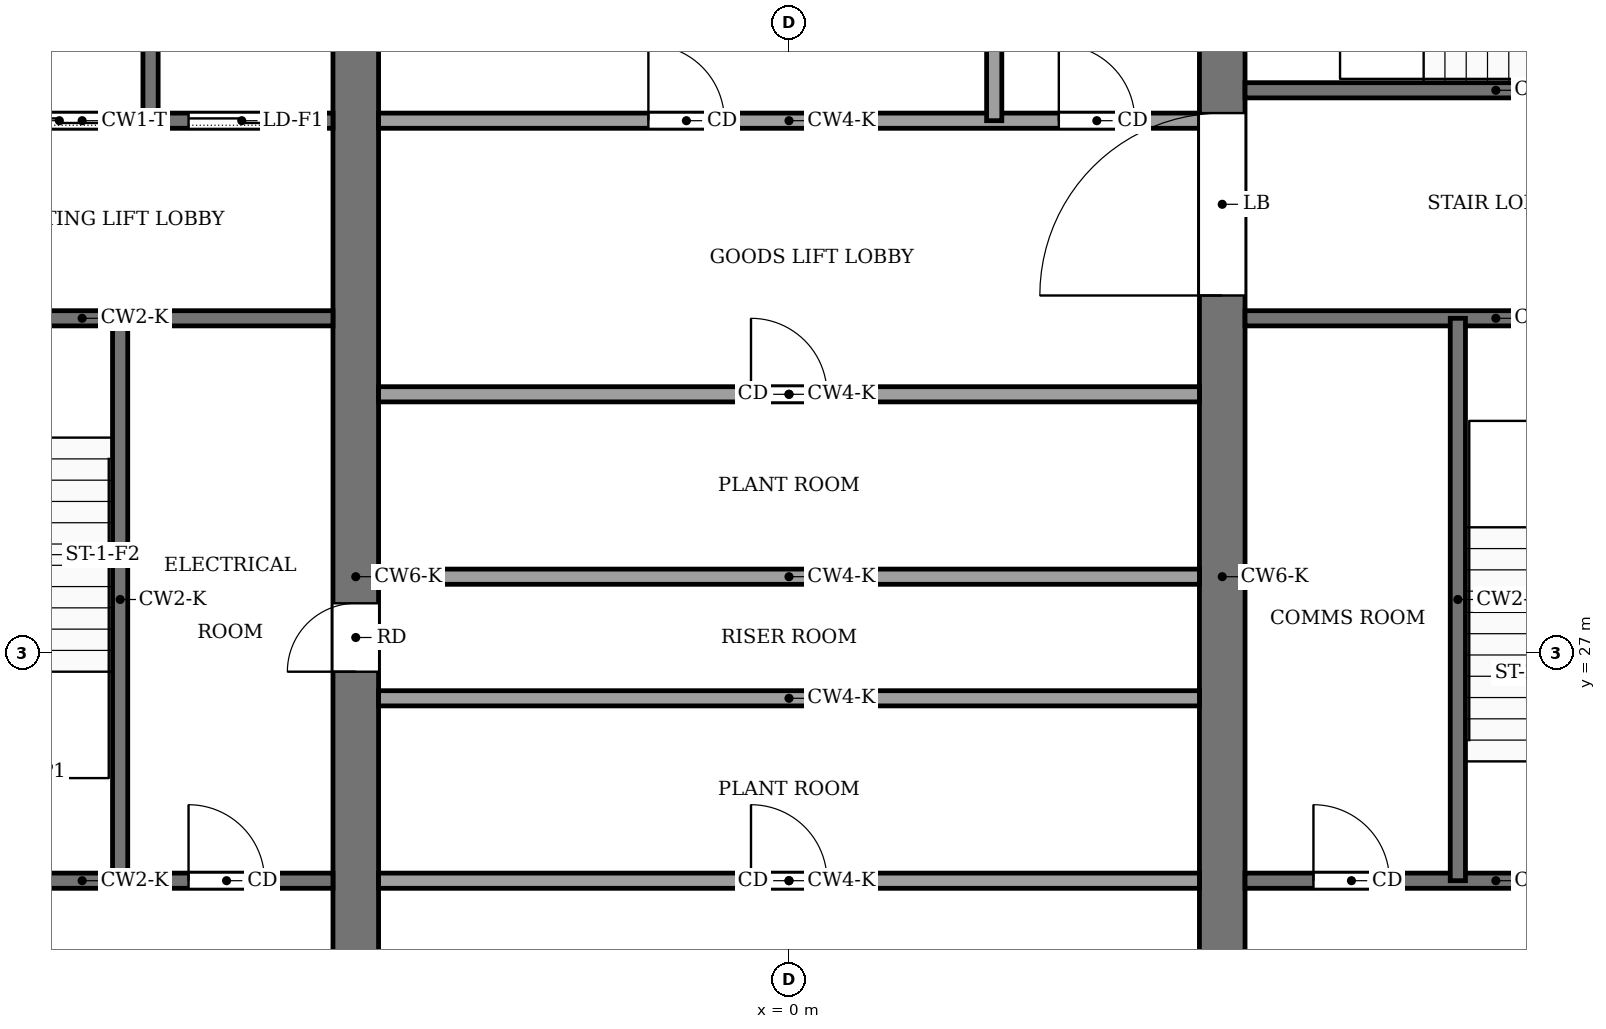
"""IFC4 building model, lengths in metres.
Left out: names, types, materials, properties, quantities, classifications, styles, units other than length and angle.
Written with IfcOpenShell. Run it as: python <this file> out.ifc"""

import sys

from ifc_helpers import new_model, si_unit, direction, frame, frame_2d, origin, place, context, subcontext, project, spatial, rectangle, extrude, element, fill, save


model = new_model("IFC4")
c1 = context("Model", 3, precision=1e-05, world=origin(), true_north=direction((0.0, 1.0)))
c2 = subcontext(c1, "Body", "Model", "MODEL_VIEW")
j1 = project(units=[si_unit("LENGTHUNIT", "METRE"), si_unit("PLANEANGLEUNIT", "RADIAN")], contexts=[c1])
p1 = place(None, origin())
s1 = spatial("IfcSite", under=j1, at=p1, CompositionType="ELEMENT")
p2 = place(p1, origin())
s2 = spatial("IfcBuilding", under=s1, at=p2, CompositionType="ELEMENT")
p3 = place(p2, frame((0.0, 0.0, 364.0)))
s3 = spatial("IfcBuildingStorey", under=s2, at=p3, CompositionType="ELEMENT", Elevation=364.0)
p4 = place(p3, frame((-5.7, 18.4, -0.15), z_axis=(0.0, 0.0, 1.0), x_axis=(0.0, 1.0, 0.0)))
e1 = element("IfcWall", 1, at=p4, inside=s3, PredefinedType="SHEAR", context=c2, shape_type="SweptSolid", body=[
    extrude(rectangle(XDim=19.2, YDim=0.6, at=frame_2d((9.6, 0.0))), origin(), (0.0, 0.0, 1.0), 4.0),
])
p5 = place(p4, frame((8.35, 0.0, 0.15)))
e2 = element("IfcOpeningElement", 2, at=p5, cuts=e1, PredefinedType="OPENING", context=c2, shape_type="SweptSolid", body=[
    extrude(rectangle(XDim=0.9, YDim=2.1, at=frame_2d((0.45, 1.05))), frame((0.0, 0.31, 0.0), z_axis=(0.0, -1.0, 0.0), x_axis=(1.0, 0.0, 0.0)), (0.0, 0.0, 1.0), 0.62),
])
p6 = place(p3, frame((5.7, 18.4, -0.15), z_axis=(0.0, 0.0, 1.0), x_axis=(0.0, 1.0, 0.0)))
e3 = element("IfcWall", 3, at=p6, inside=s3, PredefinedType="SHEAR", context=c2, shape_type="SweptSolid", body=[
    extrude(rectangle(XDim=19.2, YDim=0.6, at=frame_2d((9.6, 0.0))), origin(), (0.0, 0.0, 1.0), 4.0),
])
p7 = place(p6, frame((13.3, 0.0, 0.15)))
e4 = element("IfcOpeningElement", 4, at=p7, cuts=e3, PredefinedType="OPENING", context=c2, shape_type="SweptSolid", body=[
    extrude(rectangle(XDim=2.4, YDim=2.4, at=frame_2d((1.2, 1.2))), frame((0.0, 0.31, 0.0), z_axis=(0.0, -1.0, 0.0), x_axis=(1.0, 0.0, 0.0)), (0.0, 0.0, 1.0), 0.62),
])
p8 = place(p3, frame((-12.6, 24.0, 0.0), z_axis=(0.0, 0.0, 1.0), x_axis=(1.0, 0.0, 0.0)))
e5 = element("IfcWall", 5, at=p8, inside=s3, PredefinedType="PARTITIONING", context=c2, shape_type="SweptSolid", body=[
    extrude(rectangle(XDim=6.6, YDim=0.2, at=frame_2d((3.3, 0.0))), origin(), (0.0, 0.0, 1.0), 3.85),
])
p9 = place(p8, frame((4.7, 0.0, 0.0)))
e6 = element("IfcOpeningElement", 6, at=p9, cuts=e5, PredefinedType="OPENING", context=c2, shape_type="SweptSolid", body=[
    extrude(rectangle(XDim=1.0, YDim=2.1, at=frame_2d((0.5, 1.05))), frame((0.0, 0.11, 0.0), z_axis=(0.0, -1.0, 0.0), x_axis=(1.0, 0.0, 0.0)), (0.0, 0.0, 1.0), 0.22),
])
p10 = place(p3, frame((-5.4, 24.0, 0.0), z_axis=(0.0, 0.0, 1.0), x_axis=(1.0, 0.0, 0.0)))
e7 = element("IfcWall", 7, at=p10, inside=s3, PredefinedType="PARTITIONING", context=c2, shape_type="SweptSolid", body=[
    extrude(rectangle(XDim=10.8, YDim=0.2, at=frame_2d((5.4, 0.0))), origin(), (0.0, 0.0, 1.0), 3.85),
])
p11 = place(p10, frame((4.9, 0.0, 0.0)))
e8 = element("IfcOpeningElement", 8, at=p11, cuts=e7, PredefinedType="OPENING", context=c2, shape_type="SweptSolid", body=[
    extrude(rectangle(XDim=1.0, YDim=2.1, at=frame_2d((0.5, 1.05))), frame((0.0, 0.11, 0.0), z_axis=(0.0, -1.0, 0.0), x_axis=(1.0, 0.0, 0.0)), (0.0, 0.0, 1.0), 0.22),
])
p12 = place(p3, frame((6.0, 24.0, 0.0), z_axis=(0.0, 0.0, 1.0), x_axis=(1.0, 0.0, 0.0)))
e9 = element("IfcWall", 9, at=p12, inside=s3, PredefinedType="PARTITIONING", context=c2, shape_type="SweptSolid", body=[
    extrude(rectangle(XDim=6.6, YDim=0.2, at=frame_2d((3.3, 0.0))), origin(), (0.0, 0.0, 1.0), 3.85),
])
p13 = place(p12, frame((0.9, 0.0, 0.0)))
e10 = element("IfcOpeningElement", 10, at=p13, cuts=e9, PredefinedType="OPENING", context=c2, shape_type="SweptSolid", body=[
    extrude(rectangle(XDim=1.0, YDim=2.1, at=frame_2d((0.5, 1.05))), frame((0.0, 0.11, 0.0), z_axis=(0.0, -1.0, 0.0), x_axis=(1.0, 0.0, 0.0)), (0.0, 0.0, 1.0), 0.22),
])
p14 = place(p12, frame((4.4, 0.0, 0.0)))
e11 = element("IfcOpeningElement", 11, at=p14, cuts=e9, PredefinedType="OPENING", context=c2, shape_type="SweptSolid", body=[
    extrude(rectangle(XDim=1.2, YDim=2.2, at=frame_2d((0.6, 1.1))), frame((0.0, 0.11, 0.0), z_axis=(0.0, -1.0, 0.0), x_axis=(1.0, 0.0, 0.0)), (0.0, 0.0, 1.0), 0.22),
])
for number, where, z_axis, x_axis in (
    (12, (-5.4, 26.4, 0.0), (0.0, 0.0, 1.0), (1.0, 0.0, 0.0)),
    (13, (-5.4, 28.0, 0.0), (0.0, 0.0, 1.0), (1.0, 0.0, 0.0)),
):
    element("IfcWall", number, at=place(p3, frame(where, z_axis=z_axis, x_axis=x_axis)), inside=s3, PredefinedType="PARTITIONING", context=c2, shape_type="SweptSolid", body=[
        extrude(rectangle(XDim=10.8, YDim=0.2, at=frame_2d((5.4, 0.0))), origin(), (0.0, 0.0, 1.0), 3.85),
    ])
p15 = place(p3, frame((-5.4, 30.4, 0.0), z_axis=(0.0, 0.0, 1.0), x_axis=(1.0, 0.0, 0.0)))
e14 = element("IfcWall", 14, at=p15, inside=s3, PredefinedType="PARTITIONING", context=c2, shape_type="SweptSolid", body=[
    extrude(rectangle(XDim=10.8, YDim=0.2, at=frame_2d((5.4, 0.0))), origin(), (0.0, 0.0, 1.0), 3.85),
])
p16 = place(p15, frame((4.9, 0.0, 0.0)))
e15 = element("IfcOpeningElement", 15, at=p16, cuts=e14, PredefinedType="OPENING", context=c2, shape_type="SweptSolid", body=[
    extrude(rectangle(XDim=1.0, YDim=2.1, at=frame_2d((0.5, 1.05))), frame((0.0, 0.11, 0.0), z_axis=(0.0, -1.0, 0.0), x_axis=(1.0, 0.0, 0.0)), (0.0, 0.0, 1.0), 0.22),
])
p17 = place(p3, frame((-12.6, 31.4, 0.0), z_axis=(0.0, 0.0, 1.0), x_axis=(1.0, 0.0, 0.0)))
e16 = element("IfcWall", 16, at=p17, inside=s3, PredefinedType="PARTITIONING", context=c2, shape_type="SweptSolid", body=[
    extrude(rectangle(XDim=6.6, YDim=0.2, at=frame_2d((3.3, 0.0))), origin(), (0.0, 0.0, 1.0), 3.85),
])
p18 = place(p17, frame((1.0, 0.0, 0.0)))
e17 = element("IfcOpeningElement", 17, at=p18, cuts=e16, PredefinedType="OPENING", context=c2, shape_type="SweptSolid", body=[
    extrude(rectangle(XDim=1.2, YDim=2.2, at=frame_2d((0.6, 1.1))), frame((0.0, 0.11, 0.0), z_axis=(0.0, -1.0, 0.0), x_axis=(1.0, 0.0, 0.0)), (0.0, 0.0, 1.0), 0.22),
])
p19 = place(p3, frame((6.0, 31.4, 0.0), z_axis=(0.0, 0.0, 1.0), x_axis=(1.0, 0.0, 0.0)))
e18 = element("IfcWall", 18, at=p19, inside=s3, PredefinedType="PARTITIONING", context=c2, shape_type="SweptSolid", body=[
    extrude(rectangle(XDim=6.6, YDim=0.2, at=frame_2d((3.3, 0.0))), origin(), (0.0, 0.0, 1.0), 3.85),
])
p20 = place(p3, frame((-12.6, 34.0, 0.0), z_axis=(0.0, 0.0, 1.0), x_axis=(1.0, 0.0, 0.0)))
e19 = element("IfcWall", 19, at=p20, inside=s3, PredefinedType="PARTITIONING", context=c2, shape_type="SweptSolid", body=[
    extrude(rectangle(XDim=6.6, YDim=0.2, at=frame_2d((3.3, 0.0))), origin(), (0.0, 0.0, 1.0), 3.85),
])
p21 = place(p20, frame((4.7, 0.0, 0.0)))
e20 = element("IfcOpeningElement", 20, at=p21, cuts=e19, PredefinedType="OPENING", context=c2, shape_type="SweptSolid", body=[
    extrude(rectangle(XDim=1.4, YDim=2.2, at=frame_2d((0.7, 1.1))), frame((0.0, 0.11, 0.0), z_axis=(0.0, -1.0, 0.0), x_axis=(1.0, 0.0, 0.0)), (0.0, 0.0, 1.0), 0.22),
])
p22 = place(p20, frame((2.3, 0.0, 0.0)))
e21 = element("IfcOpeningElement", 21, at=p22, cuts=e19, PredefinedType="OPENING", context=c2, shape_type="SweptSolid", body=[
    extrude(rectangle(XDim=1.4, YDim=2.2, at=frame_2d((0.7, 1.1))), frame((0.0, 0.11, 0.0), z_axis=(0.0, -1.0, 0.0), x_axis=(1.0, 0.0, 0.0)), (0.0, 0.0, 1.0), 0.22),
])
p23 = place(p20, frame((0.45, 0.0, 0.0)))
e22 = element("IfcOpeningElement", 22, at=p23, cuts=e19, PredefinedType="OPENING", context=c2, shape_type="SweptSolid", body=[
    extrude(rectangle(XDim=0.9, YDim=2.1, at=frame_2d((0.45, 1.05))), frame((0.0, 0.11, 0.0), z_axis=(0.0, -1.0, 0.0), x_axis=(1.0, 0.0, 0.0)), (0.0, 0.0, 1.0), 0.22),
])
p24 = place(p3, frame((-5.4, 34.0, 0.0), z_axis=(0.0, 0.0, 1.0), x_axis=(1.0, 0.0, 0.0)))
e23 = element("IfcWall", 23, at=p24, inside=s3, PredefinedType="PARTITIONING", context=c2, shape_type="SweptSolid", body=[
    extrude(rectangle(XDim=10.8, YDim=0.2, at=frame_2d((5.4, 0.0))), origin(), (0.0, 0.0, 1.0), 3.85),
])
p25 = place(p24, frame((3.55, 0.0, 0.0)))
e24 = element("IfcOpeningElement", 24, at=p25, cuts=e23, PredefinedType="OPENING", context=c2, shape_type="SweptSolid", body=[
    extrude(rectangle(XDim=1.0, YDim=2.1, at=frame_2d((0.5, 1.05))), frame((0.0, 0.11, 0.0), z_axis=(0.0, -1.0, 0.0), x_axis=(1.0, 0.0, 0.0)), (0.0, 0.0, 1.0), 0.22),
])
p26 = place(p24, frame((8.95, 0.0, 0.0)))
e25 = element("IfcOpeningElement", 25, at=p26, cuts=e23, PredefinedType="OPENING", context=c2, shape_type="SweptSolid", body=[
    extrude(rectangle(XDim=1.0, YDim=2.1, at=frame_2d((0.5, 1.05))), frame((0.0, 0.11, 0.0), z_axis=(0.0, -1.0, 0.0), x_axis=(1.0, 0.0, 0.0)), (0.0, 0.0, 1.0), 0.22),
])
p27 = place(p3, frame((6.0, 34.4, 0.0), z_axis=(0.0, 0.0, 1.0), x_axis=(1.0, 0.0, 0.0)))
e26 = element("IfcWall", 26, at=p27, inside=s3, PredefinedType="PARTITIONING", context=c2, shape_type="SweptSolid", body=[
    extrude(rectangle(XDim=6.6, YDim=0.2, at=frame_2d((3.3, 0.0))), origin(), (0.0, 0.0, 1.0), 3.85),
])
p28 = place(p27, frame((4.8, 0.0, 0.0)))
e27 = element("IfcOpeningElement", 27, at=p28, cuts=e26, PredefinedType="OPENING", context=c2, shape_type="SweptSolid", body=[
    extrude(rectangle(XDim=1.2, YDim=2.2, at=frame_2d((0.6, 1.1))), frame((0.0, 0.11, 0.0), z_axis=(0.0, -1.0, 0.0), x_axis=(1.0, 0.0, 0.0)), (0.0, 0.0, 1.0), 0.22),
])
p29 = place(p3, frame((-8.8, 24.0, 0.0), z_axis=(0.0, 0.0, 1.0), x_axis=(0.0, 1.0, 0.0)))
e28 = element("IfcWall", 28, at=p29, inside=s3, PredefinedType="PARTITIONING", context=c2, shape_type="SweptSolid", body=[
    extrude(rectangle(XDim=7.4, YDim=0.2, at=frame_2d((3.7, 0.0))), origin(), (0.0, 0.0, 1.0), 3.85),
])
for number, where, z_axis, x_axis in (
    (29, (-8.4, 34.0, 0.0), (0.0, 0.0, 1.0), (0.0, 1.0, 0.0)),
    (30, (2.7, 34.0, 0.0), (0.0, 0.0, 1.0), (0.0, 1.0, 0.0)),
):
    element("IfcWall", number, at=place(p3, frame(where, z_axis=z_axis, x_axis=x_axis)), inside=s3, PredefinedType="PARTITIONING", context=c2, shape_type="SweptSolid", body=[
        extrude(rectangle(XDim=3.6, YDim=0.2, at=frame_2d((1.8, 0.0))), origin(), (0.0, 0.0, 1.0), 3.85),
    ])
p30 = place(p3, frame((8.8, 24.0, 0.0), z_axis=(0.0, 0.0, 1.0), x_axis=(0.0, 1.0, 0.0)))
e31 = element("IfcWall", 31, at=p30, inside=s3, PredefinedType="PARTITIONING", context=c2, shape_type="SweptSolid", body=[
    extrude(rectangle(XDim=7.4, YDim=0.2, at=frame_2d((3.7, 0.0))), origin(), (0.0, 0.0, 1.0), 3.85),
])
p31 = place(p21, origin())
e32 = element("IfcDoor", 32, at=p31, inside=s3, OperationType="SLIDING_TO_LEFT", PredefinedType="DOOR", context=c2, shape_type="SweptSolid", body=[
    extrude(rectangle(XDim=1.4, YDim=2.2, at=frame_2d((0.7, 1.1))), frame((0.0, 0.025, 0.0), z_axis=(0.0, -1.0, 0.0), x_axis=(1.0, 0.0, 0.0)), (0.0, 0.0, 1.0), 0.05),
])
fill(e20, e32)
p32 = place(p22, origin())
e33 = element("IfcDoor", 33, at=p32, inside=s3, OperationType="SLIDING_TO_LEFT", PredefinedType="DOOR", context=c2, shape_type="SweptSolid", body=[
    extrude(rectangle(XDim=1.4, YDim=2.2, at=frame_2d((0.7, 1.1))), frame((0.0, 0.025, 0.0), z_axis=(0.0, -1.0, 0.0), x_axis=(1.0, 0.0, 0.0)), (0.0, 0.0, 1.0), 0.05),
])
fill(e21, e33)
p33 = place(p11, origin())
e34 = element("IfcDoor", 34, at=p33, inside=s3, OperationType="SINGLE_SWING_RIGHT", PredefinedType="DOOR", context=c2, shape_type="SweptSolid", body=[
    extrude(rectangle(XDim=1.0, YDim=2.1, at=frame_2d((0.5, 1.05))), frame((0.0, 0.025, 0.0), z_axis=(0.0, -1.0, 0.0), x_axis=(1.0, 0.0, 0.0)), (0.0, 0.0, 1.0), 0.05),
])
fill(e8, e34)
p34 = place(p16, origin())
e35 = element("IfcDoor", 35, at=p34, inside=s3, OperationType="SINGLE_SWING_LEFT", PredefinedType="DOOR", context=c2, shape_type="SweptSolid", body=[
    extrude(rectangle(XDim=1.0, YDim=2.1, at=frame_2d((0.5, 1.05))), frame((0.0, 0.025, 0.0), z_axis=(0.0, -1.0, 0.0), x_axis=(1.0, 0.0, 0.0)), (0.0, 0.0, 1.0), 0.05),
])
fill(e15, e35)
p35 = place(p25, origin())
e36 = element("IfcDoor", 36, at=p35, inside=s3, OperationType="SINGLE_SWING_LEFT", PredefinedType="DOOR", context=c2, shape_type="SweptSolid", body=[
    extrude(rectangle(XDim=1.0, YDim=2.1, at=frame_2d((0.5, 1.05))), frame((0.0, 0.025, 0.0), z_axis=(0.0, -1.0, 0.0), x_axis=(1.0, 0.0, 0.0)), (0.0, 0.0, 1.0), 0.05),
])
fill(e24, e36)
p36 = place(p9, origin())
e37 = element("IfcDoor", 37, at=p36, inside=s3, OperationType="SINGLE_SWING_LEFT", PredefinedType="DOOR", context=c2, shape_type="SweptSolid", body=[
    extrude(rectangle(XDim=1.0, YDim=2.1, at=frame_2d((0.5, 1.05))), frame((0.0, 0.025, 0.0), z_axis=(0.0, -1.0, 0.0), x_axis=(1.0, 0.0, 0.0)), (0.0, 0.0, 1.0), 0.05),
])
fill(e6, e37)
p37 = place(p13, origin())
e38 = element("IfcDoor", 38, at=p37, inside=s3, OperationType="SINGLE_SWING_RIGHT", PredefinedType="DOOR", context=c2, shape_type="SweptSolid", body=[
    extrude(rectangle(XDim=1.0, YDim=2.1, at=frame_2d((0.5, 1.05))), frame((0.0, 0.025, 0.0), z_axis=(0.0, -1.0, 0.0), x_axis=(1.0, 0.0, 0.0)), (0.0, 0.0, 1.0), 0.05),
])
fill(e10, e38)
p38 = place(p26, origin())
e39 = element("IfcDoor", 39, at=p38, inside=s3, OperationType="SINGLE_SWING_LEFT", PredefinedType="DOOR", context=c2, shape_type="SweptSolid", body=[
    extrude(rectangle(XDim=1.0, YDim=2.1, at=frame_2d((0.5, 1.05))), frame((0.0, 0.025, 0.0), z_axis=(0.0, -1.0, 0.0), x_axis=(1.0, 0.0, 0.0)), (0.0, 0.0, 1.0), 0.05),
])
fill(e25, e39)
p39 = place(p5, origin())
e40 = element("IfcDoor", 40, at=p39, inside=s3, OperationType="SINGLE_SWING_LEFT", PredefinedType="DOOR", context=c2, shape_type="SweptSolid", body=[
    extrude(rectangle(XDim=0.9, YDim=2.1, at=frame_2d((0.45, 1.05))), frame((0.0, 0.025, 0.0), z_axis=(0.0, -1.0, 0.0), x_axis=(1.0, 0.0, 0.0)), (0.0, 0.0, 1.0), 0.05),
])
fill(e2, e40)
p40 = place(p7, origin())
e41 = element("IfcDoor", 41, at=p40, inside=s3, OperationType="DOUBLE_DOOR_SINGLE_SWING", PredefinedType="DOOR", context=c2, shape_type="SweptSolid", body=[
    extrude(rectangle(XDim=2.4, YDim=2.4, at=frame_2d((1.2, 1.2))), frame((0.0, 0.025, 0.0), z_axis=(0.0, -1.0, 0.0), x_axis=(1.0, 0.0, 0.0)), (0.0, 0.0, 1.0), 0.05),
])
fill(e4, e41)
save(model, sys.argv[1])
